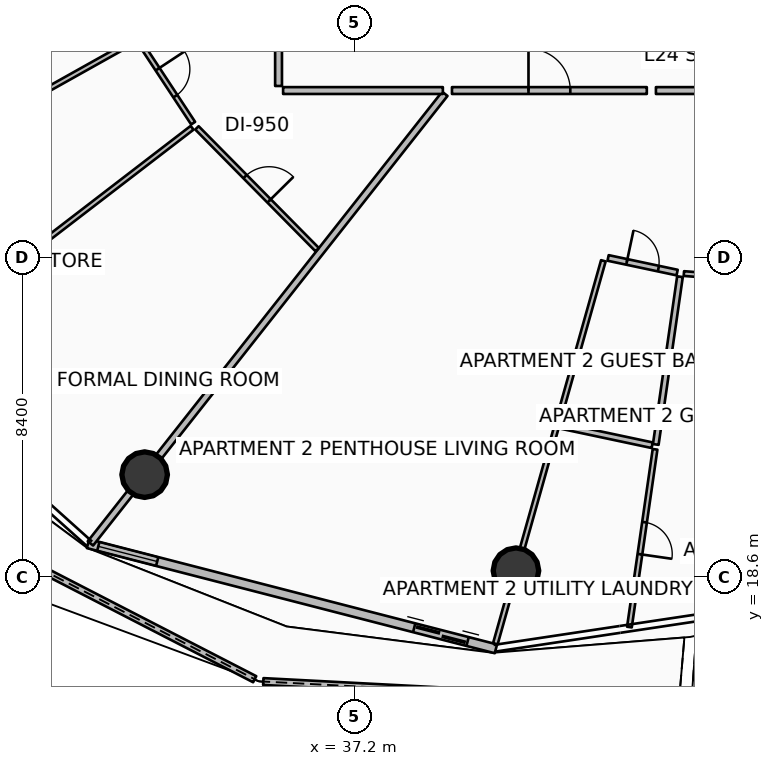
"""IFC4 building model, lengths in metres.
Left out: names, types, materials, properties, quantities, classifications, styles, units other than length and angle.
Written with IfcOpenShell. Run it as: python <this file> out.ifc"""

import sys

from ifc_helpers import new_model, si_unit, direction, frame, frame_2d, origin, origin_2d, place, context, subcontext, project, spatial, polyline, rectangle, circle, outline, extrude, element, fill, save


model = new_model("IFC4")
c1 = context("Model", 3, precision=1e-05, world=origin(), true_north=direction((0.0, 1.0)))
c2 = subcontext(c1, "Body", "Model", "MODEL_VIEW")
j1 = project(units=[si_unit("LENGTHUNIT", "METRE"), si_unit("PLANEANGLEUNIT", "RADIAN")], contexts=[c1])
p1 = place(None, origin())
s1 = spatial("IfcSite", under=j1, at=p1, CompositionType="ELEMENT")
p2 = place(p1, origin())
s2 = spatial("IfcBuilding", under=s1, at=p2, CompositionType="ELEMENT")
p3 = place(p2, frame((0.0, 0.0, 97.65)))
s3 = spatial("IfcBuildingStorey", under=s2, at=p3, CompositionType="ELEMENT", Elevation=97.65)
for number, where, z_axis, x_axis in (
    (1, (31.677, 21.294, 0.0), (0.0, 0.0, 1.0), (1.0, 0.0, 0.0)),
    (2, (41.447, 18.766, 0.0), (0.0, 0.0, 1.0), (1.0, 0.0, 0.0)),
):
    element("IfcColumn", number, at=place(p3, frame(where, z_axis=z_axis, x_axis=x_axis)), inside=s3, PredefinedType="COLUMN", context=c2, shape_type="SweptSolid", body=[
        extrude(circle(Radius=0.6, at=origin_2d()), origin(), (0.0, 0.0, 1.0), 3.5),
    ])
p4 = place(p3, frame((24.08, 21.316, 0.0), z_axis=(0.0, 0.0, 1.0), x_axis=(0.888984508261, -0.457937270892, 0.0)))
e3 = element("IfcWall", 3, at=p4, inside=s3, PredefinedType="PARAPET", context=c2, shape_type="SweptSolid", body=[
    extrude(outline(polyline([(0.0, 0.0), (11.803, 0.0), (11.803, 1.148), (5.902, 1.284), (0.0, 1.483), (0.0, 0.0)])), frame((0.0, 0.09, 0.0), z_axis=(0.0, -1.0, 0.0), x_axis=(1.0, 0.0, 0.0)), (0.0, 0.0, 1.0), 0.18),
])
p5 = place(p3, frame((34.799, 15.85, 0.0), z_axis=(0.0, 0.0, 1.0), x_axis=(0.998637836961, -0.052177299569, 0.0)))
e4 = element("IfcWall", 4, at=p5, inside=s3, PredefinedType="PARAPET", context=c2, shape_type="SweptSolid", body=[
    extrude(outline(polyline([(0.0, 0.0), (10.949, 0.0), (10.949, 1.224), (5.474, 1.127), (0.0, 1.148), (0.0, 0.0)])), frame((0.0, 0.09, 0.0), z_axis=(0.0, -1.0, 0.0), x_axis=(1.0, 0.0, 0.0)), (0.0, 0.0, 1.0), 0.18),
])
p6 = place(p3, frame((46.064, 15.314, 0.0), z_axis=(0.0, 0.0, 1.0), x_axis=(0.98127943736, 0.192589370979, 0.0)))
e5 = element("IfcWall", 5, at=p6, inside=s3, PredefinedType="PARAPET", context=c2, shape_type="SweptSolid", body=[
    extrude(outline(polyline([(0.0, 0.0), (10.041, 0.0), (10.041, 1.632), (5.021, 1.418), (0.0, 1.233), (0.0, 0.0)])), frame((0.0, 0.09, 0.0), z_axis=(0.0, -1.0, 0.0), x_axis=(1.0, 0.0, 0.0)), (0.0, 0.0, 1.0), 0.18),
])
p7 = place(p3, frame((30.186, 19.477, 0.0), z_axis=(0.0, 0.0, 1.0), x_axis=(0.968356180858, -0.249572248045, 0.0)))
e6 = element("IfcWall", 6, at=p7, inside=s3, PredefinedType="SOLIDWALL", context=c2, shape_type="SweptSolid", body=[
    extrude(rectangle(XDim=11.084, YDim=0.24, at=frame_2d((5.542, 0.0))), origin(), (0.0, 0.0, 1.0), 2.45),
])
p8 = place(p7, frame((8.865, 0.0, 0.0)))
e7 = element("IfcOpeningElement", 7, at=p8, cuts=e6, PredefinedType="OPENING", context=c2, shape_type="SweptSolid", body=[
    extrude(rectangle(XDim=1.45, YDim=2.15, at=frame_2d((0.725, 1.075))), frame((0.0, 0.13, 0.0), z_axis=(0.0, -1.0, 0.0), x_axis=(1.0, 0.0, 0.0)), (0.0, 0.0, 1.0), 0.26),
])
p9 = place(p7, frame((0.28, 0.0, 0.65)))
e8 = element("IfcOpeningElement", 8, at=p9, cuts=e6, PredefinedType="OPENING", context=c2, shape_type="SweptSolid", body=[
    extrude(rectangle(XDim=1.6, YDim=1.5, at=frame_2d((0.8, 0.75))), frame((0.0, 0.13, 0.0), z_axis=(0.0, -1.0, 0.0), x_axis=(1.0, 0.0, 0.0)), (0.0, 0.0, 1.0), 0.26),
])
p10 = place(p3, frame((39.575, 31.314, 0.0), z_axis=(0.0, 0.0, 1.0), x_axis=(-0.619083417853, -0.785325233098, 0.0)))
e9 = element("IfcWall", 9, at=p10, inside=s3, PredefinedType="PARTITIONING", context=c2, shape_type="SweptSolid", body=[
    extrude(rectangle(XDim=15.063, YDim=0.18, at=frame_2d((7.532, 0.0))), origin(), (0.0, 0.0, 1.0), 2.94),
])
p11 = place(p3, frame((30.326, 35.002, 0.0), z_axis=(0.0, 0.0, 1.0), x_axis=(-0.929777602375, -0.368121732748, 0.0)))
e10 = element("IfcWall", 10, at=p11, inside=s3, PredefinedType="PARTITIONING", context=c2, shape_type="SweptSolid", body=[
    extrude(rectangle(XDim=9.961, YDim=0.125, at=frame_2d((4.98, 0.0))), origin(), (0.0, 0.0, 1.0), 2.94),
])
p12 = place(p3, frame((35.2, 34.712, 0.0), z_axis=(0.0, 0.0, 1.0), x_axis=(0.0, -1.0, 0.0)))
e11 = element("IfcWall", 11, at=p12, inside=s3, PredefinedType="PARTITIONING", context=c2, shape_type="SweptSolid", body=[
    extrude(rectangle(XDim=3.192, YDim=0.18, at=frame_2d((1.596, 0.0))), origin(), (0.0, 0.0, 1.0), 2.94),
])
p13 = place(p3, frame((35.32, 31.4, 0.0), z_axis=(0.0, 0.0, 1.0), x_axis=(1.0, 0.0, 0.0)))
e12 = element("IfcWall", 12, at=p13, inside=s3, PredefinedType="PARTITIONING", context=c2, shape_type="SweptSolid", body=[
    extrude(rectangle(XDim=4.204, YDim=0.18, at=frame_2d((2.102, 0.0))), origin(), (0.0, 0.0, 1.0), 2.94),
])
p14 = place(p3, frame((31.406, 32.707, 0.0), z_axis=(0.0, 0.0, 1.0), x_axis=(-0.872500841978, -0.488612608052, 0.0)))
e13 = element("IfcWall", 13, at=p14, inside=s3, PredefinedType="PARTITIONING", context=c2, shape_type="SweptSolid", body=[
    extrude(rectangle(XDim=10.46, YDim=0.125, at=frame_2d((5.23, 0.0))), origin(), (0.0, 0.0, 1.0), 2.94),
])
p15 = place(p3, frame((32.925, 30.42, 0.0), z_axis=(0.0, 0.0, 1.0), x_axis=(-0.793033627653, -0.609177860244, 0.0)))
e14 = element("IfcWall", 14, at=p15, inside=s3, PredefinedType="PARTITIONING", context=c2, shape_type="SweptSolid", body=[
    extrude(rectangle(XDim=10.099, YDim=0.125, at=frame_2d((5.049, 0.0))), origin(), (0.0, 0.0, 1.0), 2.94),
])
p16 = place(p3, frame((31.548, 32.672, 0.0), z_axis=(0.0, 0.0, 1.0), x_axis=(0.550387635728, -0.834909246827, 0.0)))
e15 = element("IfcWall", 15, at=p16, inside=s3, PredefinedType="PARTITIONING", context=c2, shape_type="SweptSolid", body=[
    extrude(rectangle(XDim=2.552, YDim=0.125, at=frame_2d((1.276, 0.0))), origin(), (0.0, 0.0, 1.0), 2.94),
])
p17 = place(p16, frame((0.851, 0.0, 0.0)))
e16 = element("IfcOpeningElement", 16, at=p17, cuts=e15, PredefinedType="OPENING", context=c2, shape_type="SweptSolid", body=[
    extrude(rectangle(XDim=0.85, YDim=2.06, at=frame_2d((0.425, 1.03))), frame((0.0, 0.073, 0.0), z_axis=(0.0, -1.0, 0.0), x_axis=(1.0, 0.0, 0.0)), (0.0, 0.0, 1.0), 0.145),
])
p18 = place(p3, frame((33.053, 30.418, 0.0), z_axis=(0.0, 0.0, 1.0), x_axis=(0.702647387595, -0.711538227157, 0.0)))
e17 = element("IfcWall", 17, at=p18, inside=s3, PredefinedType="PARTITIONING", context=c2, shape_type="SweptSolid", body=[
    extrude(rectangle(XDim=4.503, YDim=0.125, at=frame_2d((2.252, 0.0))), origin(), (0.0, 0.0, 1.0), 2.94),
])
p19 = place(p18, frame((1.802, 0.0, 0.0)))
e18 = element("IfcOpeningElement", 18, at=p19, cuts=e17, PredefinedType="OPENING", context=c2, shape_type="SweptSolid", body=[
    extrude(rectangle(XDim=0.9, YDim=2.08, at=frame_2d((0.45, 1.04))), frame((0.0, 0.073, 0.0), z_axis=(0.0, -1.0, 0.0), x_axis=(1.0, 0.0, 0.0)), (0.0, 0.0, 1.0), 0.145),
])
p20 = place(p3, frame((39.764, 31.4, 0.0), z_axis=(0.0, 0.0, 1.0), x_axis=(1.0, 0.0, 0.0)))
e19 = element("IfcWall", 19, at=p20, inside=s3, PredefinedType="PARTITIONING", context=c2, shape_type="SweptSolid", body=[
    extrude(rectangle(XDim=5.127, YDim=0.18, at=frame_2d((2.563, 0.0))), origin(), (0.0, 0.0, 1.0), 2.94),
])
p21 = place(p20, frame((2.013, 0.0, 0.0)))
e20 = element("IfcOpeningElement", 20, at=p21, cuts=e19, PredefinedType="OPENING", context=c2, shape_type="SweptSolid", body=[
    extrude(rectangle(XDim=1.1, YDim=2.1, at=frame_2d((0.55, 1.05))), frame((0.0, 0.1, 0.0), z_axis=(0.0, -1.0, 0.0), x_axis=(1.0, 0.0, 0.0)), (0.0, 0.0, 1.0), 0.2),
])
p22 = place(p3, frame((45.131, 31.4, 0.0), z_axis=(0.0, 0.0, 1.0), x_axis=(1.0, 0.0, 0.0)))
e21 = element("IfcWall", 21, at=p22, inside=s3, PredefinedType="PARTITIONING", context=c2, shape_type="SweptSolid", body=[
    extrude(rectangle(XDim=4.004, YDim=0.18, at=frame_2d((2.002, 0.0))), origin(), (0.0, 0.0, 1.0), 2.94),
])
p23 = place(p3, frame((43.747, 26.92, 0.0), z_axis=(0.0, 0.0, 1.0), x_axis=(-0.271445765154, -0.962453737371, 0.0)))
e22 = element("IfcWall", 22, at=p23, inside=s3, PredefinedType="PARTITIONING", context=c2, shape_type="SweptSolid", body=[
    extrude(rectangle(XDim=10.47, YDim=0.125, at=frame_2d((5.235, 0.0))), origin(), (0.0, 0.0, 1.0), 2.94),
])
p24 = place(p3, frame((43.872, 26.996, 0.0), z_axis=(0.0, 0.0, 1.0), x_axis=(0.978233316216, -0.207508021641, 0.0)))
e23 = element("IfcWall", 23, at=p24, inside=s3, PredefinedType="PARTITIONING", context=c2, shape_type="SweptSolid", body=[
    extrude(rectangle(XDim=1.857, YDim=0.15, at=frame_2d((0.928, 0.0))), origin(), (0.0, 0.0, 1.0), 2.94),
])
p25 = place(p24, frame((0.503, 0.0, 0.0)))
e24 = element("IfcOpeningElement", 24, at=p25, cuts=e23, PredefinedType="OPENING", context=c2, shape_type="SweptSolid", body=[
    extrude(rectangle(XDim=0.85, YDim=2.06, at=frame_2d((0.425, 1.03))), frame((0.0, 0.085, 0.0), z_axis=(0.0, -1.0, 0.0), x_axis=(1.0, 0.0, 0.0)), (0.0, 0.0, 1.0), 0.17),
])
p26 = place(p3, frame((42.626, 22.578, 0.0), z_axis=(0.0, 0.0, 1.0), x_axis=(0.978227408947, -0.207535867706, 0.0)))
e25 = element("IfcWall", 25, at=p26, inside=s3, PredefinedType="PARTITIONING", context=c2, shape_type="SweptSolid", body=[
    extrude(rectangle(XDim=2.46, YDim=0.15, at=frame_2d((1.23, 0.0))), origin(), (0.0, 0.0, 1.0), 2.94),
])
p27 = place(p3, frame((45.763, 26.502, 0.0), z_axis=(0.0, 0.0, 1.0), x_axis=(-0.142823722461, -0.989748141853, 0.0)))
e26 = element("IfcWall", 26, at=p27, inside=s3, PredefinedType="PARTITIONING", context=c2, shape_type="SweptSolid", body=[
    extrude(rectangle(XDim=4.46, YDim=0.15, at=frame_2d((2.23, 0.0))), origin(), (0.0, 0.0, 1.0), 2.94),
])
p28 = place(p3, frame((45.108, 21.96, 0.0), z_axis=(0.0, 0.0, 1.0), x_axis=(-0.142860663544, -0.989742810437, 0.0)))
e27 = element("IfcWall", 27, at=p28, inside=s3, PredefinedType="PARTITIONING", context=c2, shape_type="SweptSolid", body=[
    extrude(rectangle(XDim=4.725, YDim=0.125, at=frame_2d((2.363, 0.0))), origin(), (0.0, 0.0, 1.0), 2.94),
])
p29 = place(p28, frame((1.938, 0.0, 0.0)))
e28 = element("IfcOpeningElement", 28, at=p29, cuts=e27, PredefinedType="OPENING", context=c2, shape_type="SweptSolid", body=[
    extrude(rectangle(XDim=0.85, YDim=2.06, at=frame_2d((0.425, 1.03))), frame((0.0, 0.073, 0.0), z_axis=(0.0, -1.0, 0.0), x_axis=(1.0, 0.0, 0.0)), (0.0, 0.0, 1.0), 0.145),
])
p30 = place(p3, frame((45.866, 26.585, 0.0), z_axis=(0.0, 0.0, 1.0), x_axis=(0.996949395434, -0.078050643458, 0.0)))
e29 = element("IfcWall", 29, at=p30, inside=s3, PredefinedType="PARTITIONING", context=c2, shape_type="SweptSolid", body=[
    extrude(rectangle(XDim=1.861, YDim=0.125, at=frame_2d((0.931, 0.0))), origin(), (0.0, 0.0, 1.0), 2.94),
])
p31 = place(p30, frame((0.506, 0.0, 0.0)))
e30 = element("IfcOpeningElement", 30, at=p31, cuts=e29, PredefinedType="OPENING", context=c2, shape_type="SweptSolid", body=[
    extrude(rectangle(XDim=0.85, YDim=2.06, at=frame_2d((0.425, 1.03))), frame((0.0, 0.073, 0.0), z_axis=(0.0, -1.0, 0.0), x_axis=(1.0, 0.0, 0.0)), (0.0, 0.0, 1.0), 0.145),
])
p32 = place(p8, origin())
e31 = element("IfcDoor", 31, at=p32, inside=s3, OperationType="DOUBLE_DOOR_SLIDING", PredefinedType="DOOR", context=c2, shape_type="SweptSolid", body=[
    extrude(rectangle(XDim=1.45, YDim=2.15, at=frame_2d((0.725, 1.075))), frame((0.0, 0.025, 0.0), z_axis=(0.0, -1.0, 0.0), x_axis=(1.0, 0.0, 0.0)), (0.0, 0.0, 1.0), 0.05),
])
fill(e7, e31)
p33 = place(p9, origin())
e32 = element("IfcWindow", 32, at=p33, inside=s3, PartitioningType="SINGLE_PANEL", PredefinedType="WINDOW", context=c2, shape_type="SweptSolid", body=[
    extrude(rectangle(XDim=1.6, YDim=1.5, at=frame_2d((0.8, 0.75))), frame((0.0, 0.03, 0.0), z_axis=(0.0, -1.0, 0.0), x_axis=(1.0, 0.0, 0.0)), (0.0, 0.0, 1.0), 0.06),
])
fill(e8, e32)
p34 = place(p17, origin())
e33 = element("IfcDoor", 33, at=p34, inside=s3, OperationType="SINGLE_SWING_LEFT", PredefinedType="DOOR", context=c2, shape_type="SweptSolid", body=[
    extrude(rectangle(XDim=0.85, YDim=2.06, at=frame_2d((0.425, 1.03))), frame((0.0, 0.025, 0.0), z_axis=(0.0, -1.0, 0.0), x_axis=(1.0, 0.0, 0.0)), (0.0, 0.0, 1.0), 0.05),
])
fill(e16, e33)
p35 = place(p19, origin())
e34 = element("IfcDoor", 34, at=p35, inside=s3, OperationType="SINGLE_SWING_RIGHT", PredefinedType="DOOR", context=c2, shape_type="SweptSolid", body=[
    extrude(rectangle(XDim=0.9, YDim=2.08, at=frame_2d((0.45, 1.04))), frame((0.0, 0.025, 0.0), z_axis=(0.0, -1.0, 0.0), x_axis=(1.0, 0.0, 0.0)), (0.0, 0.0, 1.0), 0.05),
])
fill(e18, e34)
p36 = place(p21, origin())
e35 = element("IfcDoor", 35, at=p36, inside=s3, OperationType="SINGLE_SWING_LEFT", PredefinedType="DOOR", context=c2, shape_type="SweptSolid", body=[
    extrude(rectangle(XDim=1.1, YDim=2.1, at=frame_2d((0.55, 1.05))), frame((0.0, 0.025, 0.0), z_axis=(0.0, -1.0, 0.0), x_axis=(1.0, 0.0, 0.0)), (0.0, 0.0, 1.0), 0.05),
])
fill(e20, e35)
p37 = place(p25, origin())
e36 = element("IfcDoor", 36, at=p37, inside=s3, OperationType="SINGLE_SWING_LEFT", PredefinedType="DOOR", context=c2, shape_type="SweptSolid", body=[
    extrude(rectangle(XDim=0.85, YDim=2.06, at=frame_2d((0.425, 1.03))), frame((0.0, 0.025, 0.0), z_axis=(0.0, -1.0, 0.0), x_axis=(1.0, 0.0, 0.0)), (0.0, 0.0, 1.0), 0.05),
])
fill(e24, e36)
p38 = place(p29, origin())
e37 = element("IfcDoor", 37, at=p38, inside=s3, OperationType="SINGLE_SWING_RIGHT", PredefinedType="DOOR", context=c2, shape_type="SweptSolid", body=[
    extrude(rectangle(XDim=0.85, YDim=2.06, at=frame_2d((0.425, 1.03))), frame((0.0, 0.025, 0.0), z_axis=(0.0, -1.0, 0.0), x_axis=(1.0, 0.0, 0.0)), (0.0, 0.0, 1.0), 0.05),
])
fill(e28, e37)
save(model, sys.argv[1])
